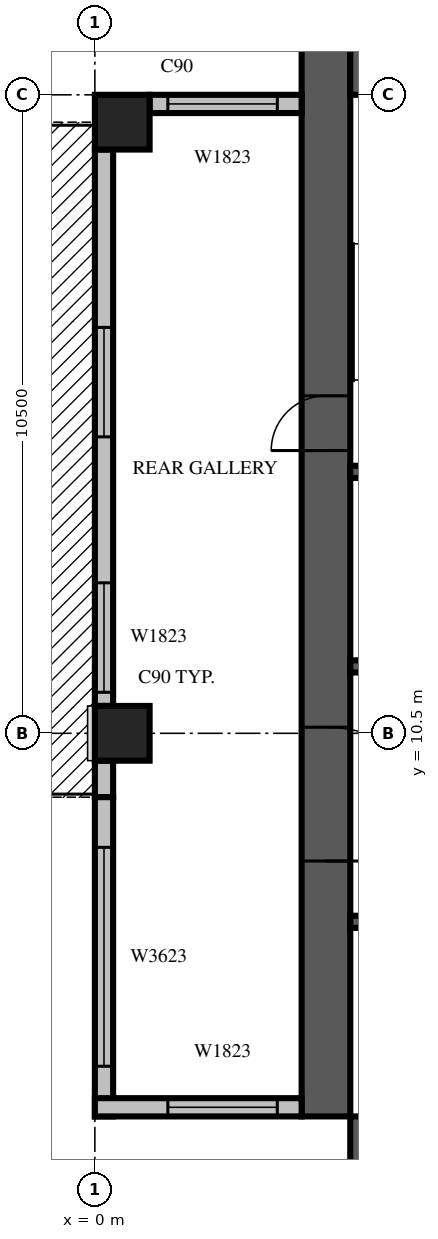
"""IFC4 building model, lengths in metres.
Left out: names, types, materials, properties, quantities, classifications, styles, units other than length and angle.
Written with IfcOpenShell. Run it as: python <this file> out.ifc"""

import sys

from ifc_helpers import new_model, si_unit, direction, frame, frame_2d, origin, origin_2d, place, context, subcontext, project, spatial, rectangle, extrude, source, transform, mapped, element, fill, save


model = new_model("IFC4")
c1 = context("Model", 3, precision=1e-05, world=origin(), true_north=direction((0.0, 1.0)))
c2 = subcontext(c1, "Body", "Model", "MODEL_VIEW")
j1 = project(units=[si_unit("LENGTHUNIT", "METRE"), si_unit("PLANEANGLEUNIT", "RADIAN")], contexts=[c1])
p1 = place(None, origin())
s1 = spatial("IfcSite", under=j1, at=p1, CompositionType="ELEMENT")
p2 = place(p1, origin())
s2 = spatial("IfcBuilding", under=s1, at=p2, CompositionType="ELEMENT")
p3 = place(p2, frame((0.0, 0.0, 223.4)))
s3 = spatial("IfcBuildingStorey", under=s2, at=p3, CompositionType="ELEMENT", Elevation=223.4)
m1 = source(origin(), c2, "Body", "SweptSolid", [
    extrude(rectangle(XDim=0.9, YDim=0.9, at=origin_2d()), origin(), (0.0, 0.0, 1.0), 3.8),
])
for number, where, z_axis, x_axis in (
    (1, (0.45, 10.5, 0.0), (0.0, 0.0, 1.0), (1.0, 0.0, 0.0)),
    (2, (0.45, 20.55, 0.0), (0.0, 0.0, 1.0), (1.0, 0.0, 0.0)),
):
    element("IfcColumn", number, at=place(p3, frame(where, z_axis=z_axis, x_axis=x_axis)), inside=s3, PredefinedType="COLUMN", context=c2, shape_type="MappedRepresentation", body=[
        mapped(m1, transform((0.0, 0.0, 0.0), scale=1.0)),
    ])
m2 = source(origin(), c2, "Body", "SweptSolid", [
    extrude(rectangle(XDim=17.6, YDim=0.8, at=frame_2d((8.8, 0.0))), origin(), (0.0, 0.0, 1.0), 3.8),
])
p4 = place(p3, frame((3.8, 4.2, 0.0), z_axis=(0.0, 0.0, 1.0), x_axis=(0.0, 1.0, 0.0)))
e3 = element("IfcWall", 3, at=p4, inside=s3, PredefinedType="SHEAR", context=c2, shape_type="MappedRepresentation", body=[
    mapped(m2, transform((0.0, 0.0, 0.0), scale=1.0)),
])
m3 = source(origin(), c2, "Body", "SweptSolid", [
    extrude(rectangle(XDim=2.2, YDim=2.1, at=frame_2d((1.1, 1.05))), frame((0.0, 0.41, 0.0), z_axis=(0.0, -1.0, 0.0), x_axis=(1.0, 0.0, 0.0)), (0.0, 0.0, 1.0), 0.82),
])
p5 = place(p4, frame((4.2, 0.0, 0.0)))
e4 = element("IfcOpeningElement", 4, at=p5, cuts=e3, PredefinedType="OPENING", context=c2, shape_type="MappedRepresentation", body=[
    mapped(m3, transform((0.0, 0.0, 0.0), scale=1.0)),
])
m4 = source(origin(), c2, "Body", "SweptSolid", [
    extrude(rectangle(XDim=0.9, YDim=2.1, at=frame_2d((0.45, 1.05))), frame((0.0, 0.41, 0.0), z_axis=(0.0, -1.0, 0.0), x_axis=(1.0, 0.0, 0.0)), (0.0, 0.0, 1.0), 0.82),
])
p6 = place(p4, frame((10.95, 0.0, 0.0)))
e5 = element("IfcOpeningElement", 5, at=p6, cuts=e3, PredefinedType="OPENING", context=c2, shape_type="MappedRepresentation", body=[
    mapped(m4, transform((0.0, 0.0, 0.0), scale=1.0)),
])
p7 = place(p3, frame((4.2, 3.8, 0.0), z_axis=(0.0, 0.0, 1.0), x_axis=(1.0, 0.0, 0.0)))
e6 = element("IfcWall", 6, at=p7, inside=s3, PredefinedType="SHEAR", context=c2, shape_type="MappedRepresentation", body=[
    mapped(m2, transform((0.0, 0.0, 0.0), scale=1.0)),
])
p8 = place(p7, frame((12.75, 0.0, 0.0)))
e7 = element("IfcOpeningElement", 7, at=p8, cuts=e6, PredefinedType="OPENING", context=c2, shape_type="MappedRepresentation", body=[
    mapped(m4, transform((0.0, 0.0, 0.0), scale=1.0)),
])
m5 = source(origin(), c2, "Body", "SweptSolid", [
    extrude(rectangle(XDim=16.8, YDim=0.8, at=frame_2d((8.4, 0.0))), origin(), (0.0, 0.0, 1.0), 3.8),
])
p9 = place(p3, frame((4.2, 21.4, 0.0), z_axis=(0.0, 0.0, 1.0), x_axis=(1.0, 0.0, 0.0)))
e8 = element("IfcWall", 8, at=p9, inside=s3, PredefinedType="SHEAR", context=c2, shape_type="MappedRepresentation", body=[
    mapped(m5, transform((0.0, 0.0, 0.0), scale=1.0)),
])
m6 = source(origin(), c2, "Body", "SweptSolid", [
    extrude(rectangle(XDim=1.2, YDim=2.1, at=frame_2d((0.6, 1.05))), frame((0.0, 0.41, 0.0), z_axis=(0.0, -1.0, 0.0), x_axis=(1.0, 0.0, 0.0)), (0.0, 0.0, 1.0), 0.82),
])
p10 = place(p9, frame((6.2, 0.0, 0.0)))
e9 = element("IfcOpeningElement", 9, at=p10, cuts=e8, PredefinedType="OPENING", context=c2, shape_type="MappedRepresentation", body=[
    mapped(m6, transform((0.0, 0.0, 0.0), scale=1.0)),
])
m7 = source(origin(), c2, "Body", "SweptSolid", [
    extrude(rectangle(XDim=2.5, YDim=0.3, at=frame_2d((1.25, 0.0))), origin(), (0.0, 0.0, 1.0), 3.4),
])
p11 = place(p3, frame((3.4, 20.85, 0.0), z_axis=(0.0, 0.0, 1.0), x_axis=(-1.0, 0.0, 0.0)))
e10 = element("IfcWall", 10, at=p11, inside=s3, PredefinedType="STANDARD", context=c2, shape_type="MappedRepresentation", body=[
    mapped(m7, transform((0.0, 0.0, 0.0), scale=1.0)),
])
m8 = source(origin(), c2, "Body", "SweptSolid", [
    extrude(rectangle(XDim=1.8, YDim=2.3, at=frame_2d((0.9, 1.15))), frame((0.0, 0.16, 0.0), z_axis=(0.0, -1.0, 0.0), x_axis=(1.0, 0.0, 0.0)), (0.0, 0.0, 1.0), 0.32),
])
p12 = place(p11, frame((0.4, 0.0, 0.6)))
e11 = element("IfcOpeningElement", 11, at=p12, cuts=e10, PredefinedType="OPENING", context=c2, shape_type="MappedRepresentation", body=[
    mapped(m8, transform((0.0, 0.0, 0.0), scale=1.0)),
])
m9 = source(origin(), c2, "Body", "SweptSolid", [
    extrude(rectangle(XDim=9.15, YDim=0.3, at=frame_2d((4.575, 0.0))), origin(), (0.0, 0.0, 1.0), 3.4),
])
p13 = place(p3, frame((0.15, 20.1, 0.0), z_axis=(0.0, 0.0, 1.0), x_axis=(0.0, -1.0, 0.0)))
e12 = element("IfcWall", 12, at=p13, inside=s3, PredefinedType="STANDARD", context=c2, shape_type="MappedRepresentation", body=[
    mapped(m9, transform((0.0, 0.0, 0.0), scale=1.0)),
])
m10 = source(origin(), c2, "Body", "SweptSolid", [
    extrude(rectangle(XDim=1.8, YDim=2.4, at=frame_2d((0.9, 1.2))), frame((0.0, 0.16, 0.0), z_axis=(0.0, -1.0, 0.0), x_axis=(1.0, 0.0, 0.0)), (0.0, 0.0, 1.0), 0.32),
])
p14 = place(p13, frame((2.925, 0.0, 0.0)))
e13 = element("IfcOpeningElement", 13, at=p14, cuts=e12, PredefinedType="OPENING", context=c2, shape_type="MappedRepresentation", body=[
    mapped(m10, transform((0.0, 0.0, 0.0), scale=1.0)),
])
p15 = place(p13, frame((7.125, 0.0, 0.6)))
e14 = element("IfcOpeningElement", 14, at=p15, cuts=e12, PredefinedType="OPENING", context=c2, shape_type="MappedRepresentation", body=[
    mapped(m8, transform((0.0, 0.0, 0.0), scale=1.0)),
])
m11 = source(origin(), c2, "Body", "SweptSolid", [
    extrude(rectangle(XDim=0.6, YDim=0.3, at=frame_2d((0.3, 0.0))), origin(), (0.0, 0.0, 1.0), 3.4),
])
p16 = place(p3, frame((0.15, 10.05, 0.0), z_axis=(0.0, 0.0, 1.0), x_axis=(0.0, -1.0, 0.0)))
e15 = element("IfcWall", 15, at=p16, inside=s3, PredefinedType="STANDARD", context=c2, shape_type="MappedRepresentation", body=[
    mapped(m11, transform((0.0, 0.0, 0.0), scale=1.0)),
])
m12 = source(origin(), c2, "Body", "SweptSolid", [
    extrude(rectangle(XDim=5.25, YDim=0.3, at=frame_2d((2.625, 0.0))), origin(), (0.0, 0.0, 1.0), 3.4),
])
p17 = place(p3, frame((0.15, 9.45, 0.0), z_axis=(0.0, 0.0, 1.0), x_axis=(0.0, -1.0, 0.0)))
e16 = element("IfcWall", 16, at=p17, inside=s3, PredefinedType="STANDARD", context=c2, shape_type="MappedRepresentation", body=[
    mapped(m12, transform((0.0, 0.0, 0.0), scale=1.0)),
])
m13 = source(origin(), c2, "Body", "SweptSolid", [
    extrude(rectangle(XDim=3.6, YDim=2.3, at=frame_2d((1.8, 1.15))), frame((0.0, 0.16, 0.0), z_axis=(0.0, -1.0, 0.0), x_axis=(1.0, 0.0, 0.0)), (0.0, 0.0, 1.0), 0.32),
])
p18 = place(p17, frame((0.825, 0.0, 0.6)))
e17 = element("IfcOpeningElement", 17, at=p18, cuts=e16, PredefinedType="OPENING", context=c2, shape_type="MappedRepresentation", body=[
    mapped(m13, transform((0.0, 0.0, 0.0), scale=1.0)),
])
m14 = source(origin(), c2, "Body", "SweptSolid", [
    extrude(rectangle(XDim=3.4, YDim=0.3, at=frame_2d((1.7, 0.0))), origin(), (0.0, 0.0, 1.0), 3.4),
])
p19 = place(p3, frame((0.0, 4.35, 0.0), z_axis=(0.0, 0.0, 1.0), x_axis=(1.0, 0.0, 0.0)))
e18 = element("IfcWall", 18, at=p19, inside=s3, PredefinedType="STANDARD", context=c2, shape_type="MappedRepresentation", body=[
    mapped(m14, transform((0.0, 0.0, 0.0), scale=1.0)),
])
p20 = place(p19, frame((1.2, 0.0, 0.6)))
e19 = element("IfcOpeningElement", 19, at=p20, cuts=e18, PredefinedType="OPENING", context=c2, shape_type="MappedRepresentation", body=[
    mapped(m8, transform((0.0, 0.0, 0.0), scale=1.0)),
])
m15 = source(origin(), c2, "Body", "SweptSolid", [
    extrude(rectangle(XDim=9.6, YDim=0.2, at=frame_2d((4.8, 0.0))), origin(), (0.0, 0.0, 1.0), 3.8),
])
p21 = place(p3, frame((4.2, 7.4, 0.0), z_axis=(0.0, 0.0, 1.0), x_axis=(1.0, 0.0, 0.0)))
e20 = element("IfcWall", 20, at=p21, inside=s3, PredefinedType="SOLIDWALL", context=c2, shape_type="MappedRepresentation", body=[
    mapped(m15, transform((0.0, 0.0, 0.0), scale=1.0)),
])
m16 = source(origin(), c2, "Body", "SweptSolid", [
    extrude(rectangle(XDim=1.1, YDim=2.1, at=frame_2d((0.55, 1.05))), frame((0.0, 0.11, 0.0), z_axis=(0.0, -1.0, 0.0), x_axis=(1.0, 0.0, 0.0)), (0.0, 0.0, 1.0), 0.22),
])
p22 = place(p21, frame((0.65, 0.0, 0.0)))
e21 = element("IfcOpeningElement", 21, at=p22, cuts=e20, PredefinedType="OPENING", context=c2, shape_type="MappedRepresentation", body=[
    mapped(m16, transform((0.0, 0.0, 0.0), scale=1.0)),
])
p23 = place(p21, frame((3.05, 0.0, 0.0)))
e22 = element("IfcOpeningElement", 22, at=p23, cuts=e20, PredefinedType="OPENING", context=c2, shape_type="MappedRepresentation", body=[
    mapped(m16, transform((0.0, 0.0, 0.0), scale=1.0)),
])
p24 = place(p21, frame((5.45, 0.0, 0.0)))
e23 = element("IfcOpeningElement", 23, at=p24, cuts=e20, PredefinedType="OPENING", context=c2, shape_type="MappedRepresentation", body=[
    mapped(m16, transform((0.0, 0.0, 0.0), scale=1.0)),
])
p25 = place(p21, frame((7.85, 0.0, 0.0)))
e24 = element("IfcOpeningElement", 24, at=p25, cuts=e20, PredefinedType="OPENING", context=c2, shape_type="MappedRepresentation", body=[
    mapped(m16, transform((0.0, 0.0, 0.0), scale=1.0)),
])
m17 = source(origin(), c2, "Body", "SweptSolid", [
    extrude(rectangle(XDim=4.8, YDim=0.2, at=frame_2d((2.4, 0.0))), origin(), (0.0, 0.0, 1.0), 3.8),
])
p26 = place(p3, frame((4.2, 11.6, 0.0), z_axis=(0.0, 0.0, 1.0), x_axis=(1.0, 0.0, 0.0)))
e25 = element("IfcWall", 25, at=p26, inside=s3, PredefinedType="SOLIDWALL", context=c2, shape_type="MappedRepresentation", body=[
    mapped(m17, transform((0.0, 0.0, 0.0), scale=1.0)),
])
p27 = place(p26, frame((0.65, 0.0, 0.0)))
e26 = element("IfcOpeningElement", 26, at=p27, cuts=e25, PredefinedType="OPENING", context=c2, shape_type="MappedRepresentation", body=[
    mapped(m16, transform((0.0, 0.0, 0.0), scale=1.0)),
])
p28 = place(p26, frame((3.05, 0.0, 0.0)))
e27 = element("IfcOpeningElement", 27, at=p28, cuts=e25, PredefinedType="OPENING", context=c2, shape_type="MappedRepresentation", body=[
    mapped(m16, transform((0.0, 0.0, 0.0), scale=1.0)),
])
p29 = place(p3, frame((4.2, 14.8, 0.0), z_axis=(0.0, 0.0, 1.0), x_axis=(1.0, 0.0, 0.0)))
e28 = element("IfcWall", 28, at=p29, inside=s3, PredefinedType="SOLIDWALL", context=c2, shape_type="MappedRepresentation", body=[
    mapped(m17, transform((0.0, 0.0, 0.0), scale=1.0)),
])
m18 = source(origin(), c2, "Body", "SweptSolid", [
    extrude(rectangle(XDim=1.8, YDim=2.3, at=frame_2d((0.9, 1.15))), frame((0.0, 0.03, 0.0), z_axis=(0.0, -1.0, 0.0), x_axis=(1.0, 0.0, 0.0)), (0.0, 0.0, 1.0), 0.06),
])
p30 = place(p12, origin())
e29 = element("IfcWindow", 29, at=p30, inside=s3, PartitioningType="SINGLE_PANEL", PredefinedType="WINDOW", context=c2, shape_type="MappedRepresentation", body=[
    mapped(m18, transform((0.0, 0.0, 0.0), scale=1.0)),
])
fill(e11, e29)
m19 = source(origin(), c2, "Body", "SweptSolid", [
    extrude(rectangle(XDim=1.8, YDim=2.4, at=frame_2d((0.9, 1.2))), frame((0.0, 0.025, 0.0), z_axis=(0.0, -1.0, 0.0), x_axis=(1.0, 0.0, 0.0)), (0.0, 0.0, 1.0), 0.05),
])
p31 = place(p14, origin())
e30 = element("IfcDoor", 30, at=p31, inside=s3, OperationType="SLIDING_TO_LEFT", PredefinedType="DOOR", context=c2, shape_type="MappedRepresentation", body=[
    mapped(m19, transform((0.0, 0.0, 0.0), scale=1.0)),
])
fill(e13, e30)
p32 = place(p15, origin())
e31 = element("IfcWindow", 31, at=p32, inside=s3, PartitioningType="SINGLE_PANEL", PredefinedType="WINDOW", context=c2, shape_type="MappedRepresentation", body=[
    mapped(m18, transform((0.0, 0.0, 0.0), scale=1.0)),
])
fill(e14, e31)
m20 = source(origin(), c2, "Body", "SweptSolid", [
    extrude(rectangle(XDim=3.6, YDim=2.3, at=frame_2d((1.8, 1.15))), frame((0.0, 0.03, 0.0), z_axis=(0.0, -1.0, 0.0), x_axis=(1.0, 0.0, 0.0)), (0.0, 0.0, 1.0), 0.06),
])
p33 = place(p18, origin())
e32 = element("IfcWindow", 32, at=p33, inside=s3, PartitioningType="SINGLE_PANEL", PredefinedType="WINDOW", context=c2, shape_type="MappedRepresentation", body=[
    mapped(m20, transform((0.0, 0.0, 0.0), scale=1.0)),
])
fill(e17, e32)
p34 = place(p20, origin())
e33 = element("IfcWindow", 33, at=p34, inside=s3, PartitioningType="SINGLE_PANEL", PredefinedType="WINDOW", context=c2, shape_type="MappedRepresentation", body=[
    mapped(m18, transform((0.0, 0.0, 0.0), scale=1.0)),
])
fill(e19, e33)
m21 = source(origin(), c2, "Body", "SweptSolid", [
    extrude(rectangle(XDim=2.2, YDim=2.1, at=frame_2d((1.1, 1.05))), frame((0.0, 0.025, 0.0), z_axis=(0.0, -1.0, 0.0), x_axis=(1.0, 0.0, 0.0)), (0.0, 0.0, 1.0), 0.05),
])
p35 = place(p5, origin())
e34 = element("IfcDoor", 34, at=p35, inside=s3, OperationType="DOUBLE_DOOR_SINGLE_SWING", PredefinedType="DOOR", context=c2, shape_type="MappedRepresentation", body=[
    mapped(m21, transform((0.0, 0.0, 0.0), scale=1.0)),
])
fill(e4, e34)
m22 = source(origin(), c2, "Body", "SweptSolid", [
    extrude(rectangle(XDim=0.9, YDim=2.1, at=frame_2d((0.45, 1.05))), frame((0.0, 0.025, 0.0), z_axis=(0.0, -1.0, 0.0), x_axis=(1.0, 0.0, 0.0)), (0.0, 0.0, 1.0), 0.05),
])
p36 = place(p6, origin())
e35 = element("IfcDoor", 35, at=p36, inside=s3, OperationType="SINGLE_SWING_LEFT", PredefinedType="DOOR", context=c2, shape_type="MappedRepresentation", body=[
    mapped(m22, transform((0.0, 0.0, 0.0), scale=1.0)),
])
fill(e5, e35)
save(model, sys.argv[1])
